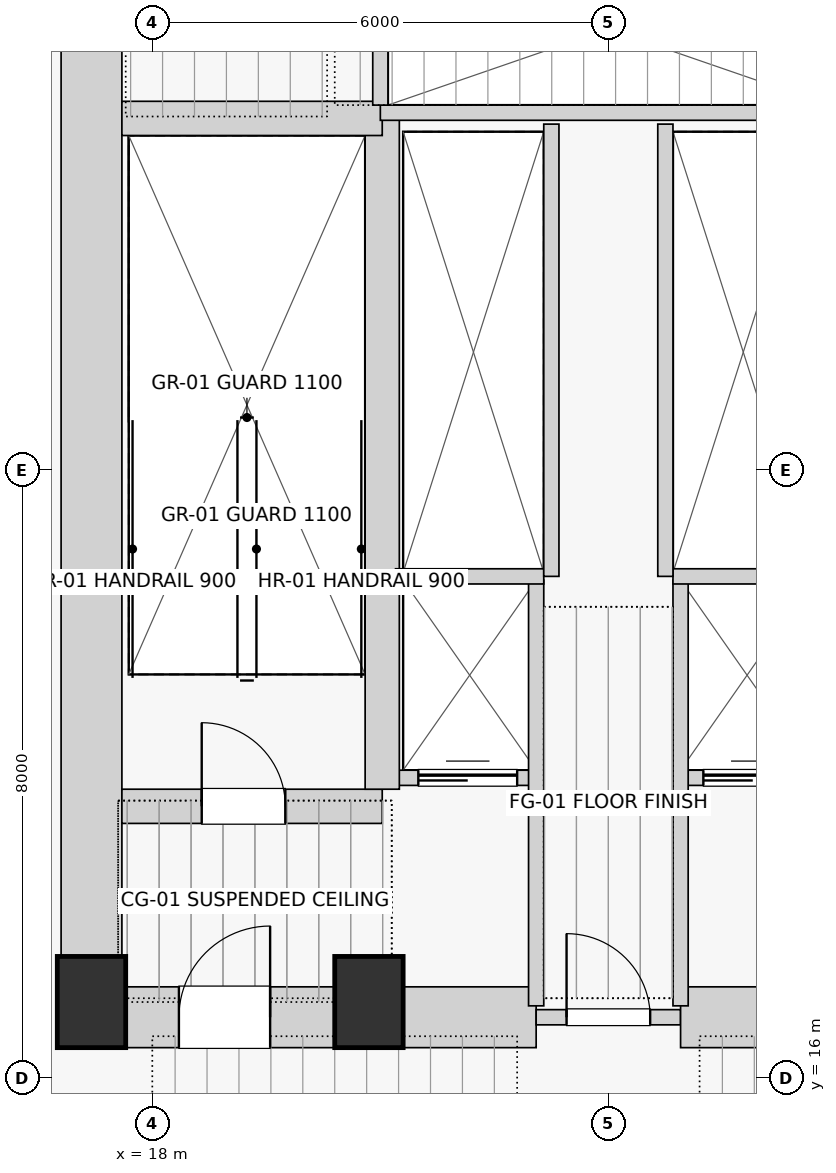
"""IFC4 building model, lengths in metres.
Left out: names, types, materials, properties, quantities, classifications, styles, units other than length and angle.
Written with IfcOpenShell. Run it as: python <this file> out.ifc"""

import sys

from ifc_helpers import new_model, si_unit, direction, frame, frame_2d, origin, origin_2d, place, context, subcontext, project, spatial, rectangle, extrude, source, transform, mapped, element, fill, save


model = new_model("IFC4")
c1 = context("Model", 3, precision=1e-05, world=origin(), true_north=direction((0.0, 1.0)))
c2 = subcontext(c1, "Body", "Model", "MODEL_VIEW")
j1 = project(units=[si_unit("LENGTHUNIT", "METRE"), si_unit("PLANEANGLEUNIT", "RADIAN")], contexts=[c1])
p1 = place(None, origin())
s1 = spatial("IfcSite", under=j1, at=p1, CompositionType="ELEMENT")
p2 = place(p1, origin())
s2 = spatial("IfcBuilding", under=s1, at=p2, CompositionType="ELEMENT")
p3 = place(p2, frame((0.0, 0.0, 18.4)))
s3 = spatial("IfcBuildingStorey", under=s2, at=p3, CompositionType="ELEMENT", Elevation=18.4)
for number, where, z_axis, x_axis in (
    (1, (17.2, 17.0, 0.0), (0.0, 0.0, 1.0), (1.0, 0.0, 0.0)),
    (2, (20.85, 17.0, 0.0), (0.0, 0.0, 1.0), (1.0, 0.0, 0.0)),
):
    element("IfcColumn", number, at=place(p3, frame(where, z_axis=z_axis, x_axis=x_axis)), inside=s3, PredefinedType="PILASTER", context=c2, shape_type="SweptSolid", body=[
        extrude(rectangle(XDim=0.9, YDim=1.2, at=origin_2d()), origin(), (0.0, 0.0, 1.0), 4.4),
    ])
p4 = place(p3, frame((17.2, 16.8, 0.0), z_axis=(0.0, 0.0, 1.0), x_axis=(0.0, 1.0, 0.0)))
e3 = element("IfcWall", 3, at=p4, inside=s3, PredefinedType="SHEAR", context=c2, shape_type="SweptSolid", body=[
    extrude(rectangle(XDim=14.2, YDim=0.8, at=frame_2d((7.1, 0.0))), origin(), (0.0, 0.0, 1.0), 4.05),
])
p5 = place(p3, frame((17.2, 16.8, 0.0), z_axis=(0.0, 0.0, 1.0), x_axis=(1.0, 0.0, 0.0)))
e4 = element("IfcWall", 4, at=p5, inside=s3, PredefinedType="SHEAR", context=c2, shape_type="SweptSolid", body=[
    extrude(rectangle(XDim=5.85, YDim=0.8, at=frame_2d((2.925, 0.0))), origin(), (0.0, 0.0, 1.0), 4.05),
])
p6 = place(p5, frame((1.15, 0.0, 0.0)))
e5 = element("IfcOpeningElement", 5, at=p6, cuts=e4, PredefinedType="OPENING", context=c2, shape_type="SweptSolid", body=[
    extrude(rectangle(XDim=1.2, YDim=2.03, at=frame_2d((0.6, 1.015))), frame((0.0, 0.41, 0.0), z_axis=(0.0, -1.0, 0.0), x_axis=(1.0, 0.0, 0.0)), (0.0, 0.0, 1.0), 0.82),
])
p7 = place(p3, frame((23.05, 16.8, 0.0), z_axis=(0.0, 0.0, 1.0), x_axis=(1.0, 0.0, 0.0)))
e6 = element("IfcWall", 6, at=p7, inside=s3, PredefinedType="SOLIDWALL", context=c2, shape_type="SweptSolid", body=[
    extrude(rectangle(XDim=1.9, YDim=0.2, at=frame_2d((0.95, 0.0))), origin(), (0.0, 0.0, 1.0), 3.2),
])
p8 = place(p7, frame((0.4, 0.0, 0.0)))
e7 = element("IfcOpeningElement", 7, at=p8, cuts=e6, PredefinedType="OPENING", context=c2, shape_type="SweptSolid", body=[
    extrude(rectangle(XDim=1.1, YDim=2.03, at=frame_2d((0.55, 1.015))), frame((0.0, 0.11, 0.0), z_axis=(0.0, -1.0, 0.0), x_axis=(1.0, 0.0, 0.0)), (0.0, 0.0, 1.0), 0.22),
])
p9 = place(p3, frame((24.95, 16.8, 0.0), z_axis=(0.0, 0.0, 1.0), x_axis=(1.0, 0.0, 0.0)))
e8 = element("IfcWall", 8, at=p9, inside=s3, PredefinedType="SHEAR", context=c2, shape_type="SweptSolid", body=[
    extrude(rectangle(XDim=5.85, YDim=0.8, at=frame_2d((2.925, 0.0))), origin(), (0.0, 0.0, 1.0), 4.05),
])
p10 = place(p9, frame((2.15, 0.0, 0.0)))
e9 = element("IfcOpeningElement", 9, at=p10, cuts=e8, PredefinedType="OPENING", context=c2, shape_type="SweptSolid", body=[
    extrude(rectangle(XDim=1.2, YDim=2.03, at=frame_2d((0.6, 1.015))), frame((0.0, 0.41, 0.0), z_axis=(0.0, -1.0, 0.0), x_axis=(1.0, 0.0, 0.0)), (0.0, 0.0, 1.0), 0.82),
])
p11 = place(p3, frame((17.6, 19.575, 0.0), z_axis=(0.0, 0.0, 1.0), x_axis=(1.0, 0.0, 0.0)))
e10 = element("IfcWall", 10, at=p11, inside=s3, PredefinedType="SHEAR", context=c2, shape_type="SweptSolid", body=[
    extrude(rectangle(XDim=3.425, YDim=0.45, at=frame_2d((1.712, 0.0))), origin(), (0.0, 0.0, 1.0), 4.05),
])
p12 = place(p11, frame((1.05, 0.0, 0.0)))
e11 = element("IfcOpeningElement", 11, at=p12, cuts=e10, PredefinedType="OPENING", context=c2, shape_type="SweptSolid", body=[
    extrude(rectangle(XDim=1.1, YDim=2.03, at=frame_2d((0.55, 1.015))), frame((0.0, 0.235, 0.0), z_axis=(0.0, -1.0, 0.0), x_axis=(1.0, 0.0, 0.0)), (0.0, 0.0, 1.0), 0.47),
])
p13 = place(p3, frame((21.2, 19.95, 0.0), z_axis=(0.0, 0.0, 1.0), x_axis=(1.0, 0.0, 0.0)))
e12 = element("IfcWall", 12, at=p13, inside=s3, PredefinedType="SOLIDWALL", context=c2, shape_type="SweptSolid", body=[
    extrude(rectangle(XDim=1.85, YDim=0.2, at=frame_2d((0.925, 0.0))), origin(), (0.0, 0.0, 1.0), 4.05),
])
p14 = place(p13, frame((0.3, 0.0, 0.0)))
e13 = element("IfcOpeningElement", 13, at=p14, cuts=e12, PredefinedType="OPENING", context=c2, shape_type="SweptSolid", body=[
    extrude(rectangle(XDim=1.3, YDim=2.25, at=frame_2d((0.65, 1.125))), frame((0.0, 0.11, 0.0), z_axis=(0.0, -1.0, 0.0), x_axis=(1.0, 0.0, 0.0)), (0.0, 0.0, 1.0), 0.22),
])
p15 = place(p3, frame((24.95, 19.95, 0.0), z_axis=(0.0, 0.0, 1.0), x_axis=(1.0, 0.0, 0.0)))
e14 = element("IfcWall", 14, at=p15, inside=s3, PredefinedType="SOLIDWALL", context=c2, shape_type="SweptSolid", body=[
    extrude(rectangle(XDim=1.85, YDim=0.2, at=frame_2d((0.925, 0.0))), origin(), (0.0, 0.0, 1.0), 4.05),
])
p16 = place(p15, frame((0.3, 0.0, 0.0)))
e15 = element("IfcOpeningElement", 15, at=p16, cuts=e14, PredefinedType="OPENING", context=c2, shape_type="SweptSolid", body=[
    extrude(rectangle(XDim=1.3, YDim=2.25, at=frame_2d((0.65, 1.125))), frame((0.0, 0.11, 0.0), z_axis=(0.0, -1.0, 0.0), x_axis=(1.0, 0.0, 0.0)), (0.0, 0.0, 1.0), 0.22),
])
p17 = place(p3, frame((21.025, 19.8, 0.0), z_axis=(0.0, 0.0, 1.0), x_axis=(0.0, 1.0, 0.0)))
e16 = element("IfcWall", 16, at=p17, inside=s3, PredefinedType="SHEAR", context=c2, shape_type="SweptSolid", body=[
    extrude(rectangle(XDim=8.825, YDim=0.45, at=frame_2d((4.413, 0.0))), origin(), (0.0, 0.0, 1.0), 4.05),
])
p18 = place(p3, frame((17.6, 28.625, 0.0), z_axis=(0.0, 0.0, 1.0), x_axis=(1.0, 0.0, 0.0)))
e17 = element("IfcWall", 17, at=p18, inside=s3, PredefinedType="SHEAR", context=c2, shape_type="SweptSolid", body=[
    extrude(rectangle(XDim=3.425, YDim=0.45, at=frame_2d((1.712, 0.0))), origin(), (0.0, 0.0, 1.0), 4.05),
])
for number, where, z_axis, x_axis in (
    (18, (23.05, 16.95, 0.0), (0.0, 0.0, 1.0), (0.0, 1.0, 0.0)),
    (19, (24.95, 16.95, 0.0), (0.0, 0.0, 1.0), (0.0, 1.0, 0.0)),
):
    element("IfcWall", number, at=place(p3, frame(where, z_axis=z_axis, x_axis=x_axis)), inside=s3, PredefinedType="SOLIDWALL", context=c2, shape_type="SweptSolid", body=[
        extrude(rectangle(XDim=5.6, YDim=0.2, at=frame_2d((2.8, 0.0))), origin(), (0.0, 0.0, 1.0), 4.05),
    ])
for number, where, z_axis, x_axis in (
    (20, (21.2, 22.6, 0.0), (0.0, 0.0, 1.0), (1.0, 0.0, 0.0)),
    (21, (24.85, 22.6, 0.0), (0.0, 0.0, 1.0), (1.0, 0.0, 0.0)),
):
    element("IfcWall", number, at=place(p3, frame(where, z_axis=z_axis, x_axis=x_axis)), inside=s3, PredefinedType="SOLIDWALL", context=c2, shape_type="SweptSolid", body=[
        extrude(rectangle(XDim=1.95, YDim=0.2, at=frame_2d((0.975, 0.0))), origin(), (0.0, 0.0, 1.0), 4.05),
    ])
p19 = place(p3, frame((21.0, 28.7, 0.0), z_axis=(0.0, 0.0, 1.0), x_axis=(1.0, 0.0, 0.0)))
e22 = element("IfcWall", 22, at=p19, inside=s3, PredefinedType="SOLIDWALL", context=c2, shape_type="SweptSolid", body=[
    extrude(rectangle(XDim=6.0, YDim=0.2, at=frame_2d((3.0, 0.0))), origin(), (0.0, 0.0, 1.0), 4.05),
])
p20 = place(p3, frame((21.0, 28.8, 0.0), z_axis=(0.0, 0.0, 1.0), x_axis=(0.0, 1.0, 0.0)))
e23 = element("IfcWall", 23, at=p20, inside=s3, PredefinedType="SOLIDWALL", context=c2, shape_type="SweptSolid", body=[
    extrude(rectangle(XDim=1.6, YDim=0.2, at=frame_2d((0.8, 0.0))), origin(), (0.0, 0.0, 1.0), 4.05),
])
for number, where, z_axis, x_axis in (
    (24, (23.25, 22.6, 0.0), (0.0, 0.0, 1.0), (0.0, 1.0, 0.0)),
    (25, (24.75, 22.6, 0.0), (0.0, 0.0, 1.0), (0.0, 1.0, 0.0)),
):
    element("IfcWall", number, at=place(p3, frame(where, z_axis=z_axis, x_axis=x_axis)), inside=s3, PredefinedType="SOLIDWALL", context=c2, shape_type="SweptSolid", body=[
        extrude(rectangle(XDim=5.95, YDim=0.2, at=frame_2d((2.975, 0.0))), origin(), (0.0, 0.0, 1.0), 4.05),
    ])
m1 = source(origin(), c2, "Body", "SweptSolid", [
    extrude(rectangle(XDim=1.2, YDim=2.03, at=frame_2d((0.6, 1.015))), frame((0.0, 0.025, 0.0), z_axis=(0.0, -1.0, 0.0), x_axis=(1.0, 0.0, 0.0)), (0.0, 0.0, 1.0), 0.05),
])
p21 = place(p6, origin())
e26 = element("IfcDoor", 26, at=p21, inside=s3, OperationType="SINGLE_SWING_RIGHT", PredefinedType="DOOR", context=c2, shape_type="MappedRepresentation", body=[
    mapped(m1, transform((0.0, 0.0, 0.0), scale=1.0)),
])
fill(e5, e26)
m2 = source(origin(), c2, "Body", "SweptSolid", [
    extrude(rectangle(XDim=1.1, YDim=2.03, at=frame_2d((0.55, 1.015))), frame((0.0, 0.025, 0.0), z_axis=(0.0, -1.0, 0.0), x_axis=(1.0, 0.0, 0.0)), (0.0, 0.0, 1.0), 0.05),
])
p22 = place(p8, origin())
e27 = element("IfcDoor", 27, at=p22, inside=s3, OperationType="SINGLE_SWING_LEFT", PredefinedType="DOOR", context=c2, shape_type="MappedRepresentation", body=[
    mapped(m2, transform((0.0, 0.0, 0.0), scale=1.0)),
])
fill(e7, e27)
p23 = place(p12, origin())
e28 = element("IfcDoor", 28, at=p23, inside=s3, OperationType="SINGLE_SWING_LEFT", PredefinedType="DOOR", context=c2, shape_type="MappedRepresentation", body=[
    mapped(m2, transform((0.0, 0.0, 0.0), scale=1.0)),
])
fill(e11, e28)
m3 = source(origin(), c2, "Body", "SweptSolid", [
    extrude(rectangle(XDim=1.3, YDim=2.25, at=frame_2d((0.65, 1.125))), frame((0.0, 0.025, 0.0), z_axis=(0.0, -1.0, 0.0), x_axis=(1.0, 0.0, 0.0)), (0.0, 0.0, 1.0), 0.05),
])
p24 = place(p14, origin())
e29 = element("IfcDoor", 29, at=p24, inside=s3, OperationType="SLIDING_TO_LEFT", PredefinedType="DOOR", context=c2, shape_type="MappedRepresentation", body=[
    mapped(m3, transform((0.0, 0.0, 0.0), scale=1.0)),
])
fill(e13, e29)
p25 = place(p16, origin())
e30 = element("IfcDoor", 30, at=p25, inside=s3, OperationType="SLIDING_TO_LEFT", PredefinedType="DOOR", context=c2, shape_type="MappedRepresentation", body=[
    mapped(m3, transform((0.0, 0.0, 0.0), scale=1.0)),
])
fill(e15, e30)
save(model, sys.argv[1])
